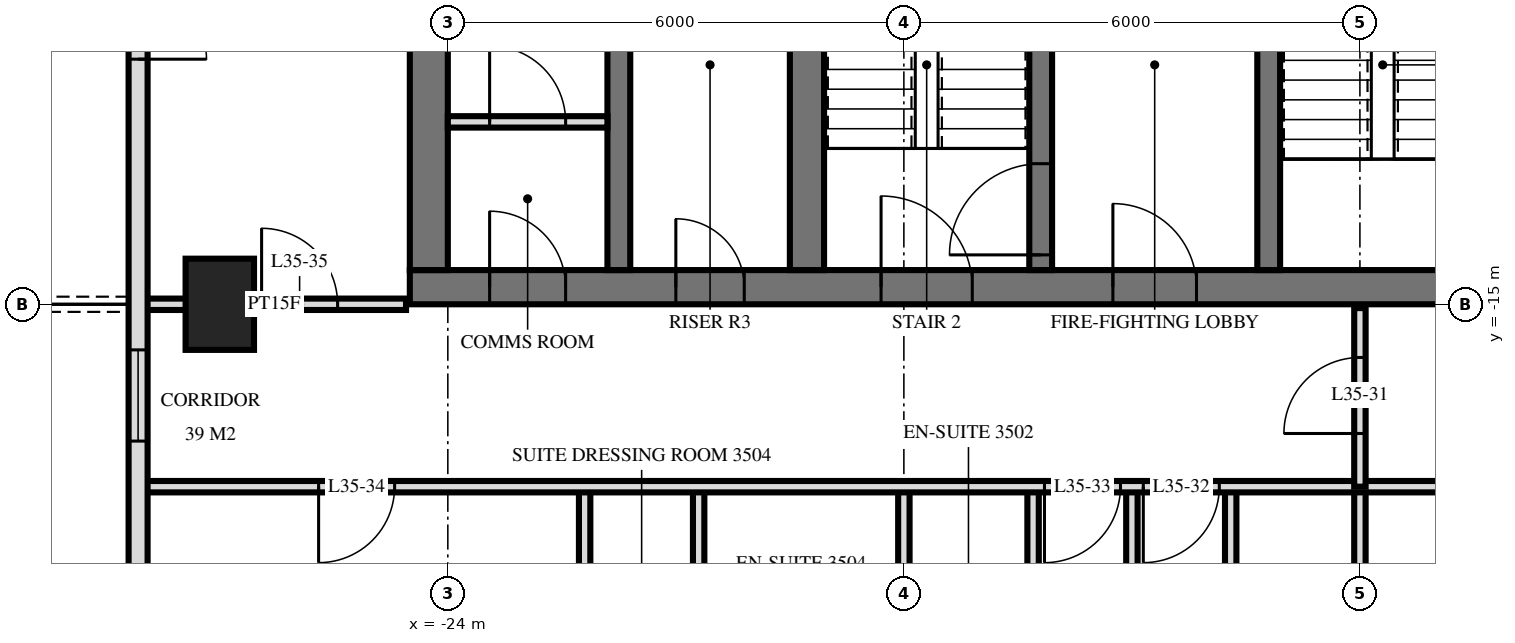
"""IFC4 building model, lengths in metres.
Left out: names, types, materials, properties, quantities, classifications, styles, units other than length and angle.
Written with IfcOpenShell. Run it as: python <this file> out.ifc"""

import sys

from ifc_helpers import new_model, si_unit, direction, frame, frame_2d, origin, origin_2d, place, context, subcontext, project, spatial, rectangle, extrude, element, fill, save


model = new_model("IFC4")
c1 = context("Model", 3, precision=1e-05, world=origin(), true_north=direction((0.0, 1.0)))
c2 = subcontext(c1, "Body", "Model", "MODEL_VIEW")
j1 = project(units=[si_unit("LENGTHUNIT", "METRE"), si_unit("PLANEANGLEUNIT", "RADIAN")], contexts=[c1])
p1 = place(None, origin())
s1 = spatial("IfcSite", under=j1, at=p1, CompositionType="ELEMENT")
p2 = place(p1, origin())
s2 = spatial("IfcBuilding", under=s1, at=p2, CompositionType="ELEMENT")
p3 = place(p2, frame((0.0, 0.0, 138.0)))
s3 = spatial("IfcBuildingStorey", under=s2, at=p3, CompositionType="ELEMENT", Elevation=138.0)
p4 = place(p3, frame((-27.0, -15.0, 0.0), z_axis=(0.0, 0.0, 1.0), x_axis=(0.0, 1.0, 0.0)))
e1 = element("IfcColumn", 1, at=p4, inside=s3, PredefinedType="COLUMN", context=c2, shape_type="SweptSolid", body=[
    extrude(rectangle(XDim=1.2, YDim=0.9, at=origin_2d()), origin(), (0.0, 0.0, 1.0), 3.6),
])
p5 = place(p3, frame((-24.5, -14.775, 0.0), z_axis=(0.0, 0.0, 1.0), x_axis=(1.0, 0.0, 0.0)))
e2 = element("IfcWall", 2, at=p5, inside=s3, PredefinedType="SHEAR", context=c2, shape_type="SweptSolid", body=[
    extrude(rectangle(XDim=14.5, YDim=0.45, at=frame_2d((7.25, 0.0))), origin(), (0.0, 0.0, 1.0), 3.6),
])
p6 = place(p5, frame((6.2, 0.0, 0.0)))
e3 = element("IfcOpeningElement", 3, at=p6, cuts=e2, PredefinedType="OPENING", context=c2, shape_type="SweptSolid", body=[
    extrude(rectangle(XDim=1.2, YDim=2.1, at=frame_2d((0.6, 1.05))), frame((0.0, 0.235, 0.0), z_axis=(0.0, -1.0, 0.0), x_axis=(1.0, 0.0, 0.0)), (0.0, 0.0, 1.0), 0.47),
])
p7 = place(p5, frame((9.25, 0.0, 0.0)))
e4 = element("IfcOpeningElement", 4, at=p7, cuts=e2, PredefinedType="OPENING", context=c2, shape_type="SweptSolid", body=[
    extrude(rectangle(XDim=1.1, YDim=2.1, at=frame_2d((0.55, 1.05))), frame((0.0, 0.235, 0.0), z_axis=(0.0, -1.0, 0.0), x_axis=(1.0, 0.0, 0.0)), (0.0, 0.0, 1.0), 0.47),
])
p8 = place(p5, frame((3.5, 0.0, 0.0)))
e5 = element("IfcOpeningElement", 5, at=p8, cuts=e2, PredefinedType="OPENING", context=c2, shape_type="SweptSolid", body=[
    extrude(rectangle(XDim=0.9, YDim=2.1, at=frame_2d((0.45, 1.05))), frame((0.0, 0.235, 0.0), z_axis=(0.0, -1.0, 0.0), x_axis=(1.0, 0.0, 0.0)), (0.0, 0.0, 1.0), 0.47),
])
p9 = place(p5, frame((1.05, 0.0, 0.0)))
e6 = element("IfcOpeningElement", 6, at=p9, cuts=e2, PredefinedType="OPENING", context=c2, shape_type="SweptSolid", body=[
    extrude(rectangle(XDim=1.0, YDim=2.1, at=frame_2d((0.5, 1.05))), frame((0.0, 0.235, 0.0), z_axis=(0.0, -1.0, 0.0), x_axis=(1.0, 0.0, 0.0)), (0.0, 0.0, 1.0), 0.47),
])
p10 = place(p3, frame((-24.25, -14.55, 0.0), z_axis=(0.0, 0.0, 1.0), x_axis=(0.0, 1.0, 0.0)))
e7 = element("IfcWall", 7, at=p10, inside=s3, PredefinedType="SHEAR", context=c2, shape_type="SweptSolid", body=[
    extrude(rectangle(XDim=14.1, YDim=0.5, at=frame_2d((7.05, 0.0))), origin(), (0.0, 0.0, 1.0), 3.6),
])
p11 = place(p3, frame((-13.2, -14.55, 0.0), z_axis=(0.0, 0.0, 1.0), x_axis=(0.0, 1.0, 0.0)))
e8 = element("IfcWall", 8, at=p11, inside=s3, PredefinedType="SHEAR", context=c2, shape_type="SweptSolid", body=[
    extrude(rectangle(XDim=5.4, YDim=0.3, at=frame_2d((2.7, 0.0))), origin(), (0.0, 0.0, 1.0), 3.6),
])
p12 = place(p11, frame((4.0, 0.0, 0.0)))
e9 = element("IfcOpeningElement", 9, at=p12, cuts=e8, PredefinedType="OPENING", context=c2, shape_type="SweptSolid", body=[
    extrude(rectangle(XDim=1.2, YDim=2.1, at=frame_2d((0.6, 1.05))), frame((0.0, 0.16, 0.0), z_axis=(0.0, -1.0, 0.0), x_axis=(1.0, 0.0, 0.0)), (0.0, 0.0, 1.0), 0.32),
])
p13 = place(p3, frame((-16.2, -14.55, 0.0), z_axis=(0.0, 0.0, 1.0), x_axis=(0.0, 1.0, 0.0)))
e10 = element("IfcWall", 10, at=p13, inside=s3, PredefinedType="SHEAR", context=c2, shape_type="SweptSolid", body=[
    extrude(rectangle(XDim=5.4, YDim=0.3, at=frame_2d((2.7, 0.0))), origin(), (0.0, 0.0, 1.0), 3.6),
])
p14 = place(p13, frame((0.2, 0.0, 0.0)))
e11 = element("IfcOpeningElement", 11, at=p14, cuts=e10, PredefinedType="OPENING", context=c2, shape_type="SweptSolid", body=[
    extrude(rectangle(XDim=1.2, YDim=2.1, at=frame_2d((0.6, 1.05))), frame((0.0, 0.16, 0.0), z_axis=(0.0, -1.0, 0.0), x_axis=(1.0, 0.0, 0.0)), (0.0, 0.0, 1.0), 0.32),
])
p15 = place(p3, frame((-19.275, -14.55, 0.0), z_axis=(0.0, 0.0, 1.0), x_axis=(0.0, 1.0, 0.0)))
e12 = element("IfcWall", 12, at=p15, inside=s3, PredefinedType="SHEAR", context=c2, shape_type="SweptSolid", body=[
    extrude(rectangle(XDim=5.4, YDim=0.45, at=frame_2d((2.7, 0.0))), origin(), (0.0, 0.0, 1.0), 3.6),
])
p16 = place(p3, frame((-21.75, -14.55, 0.0), z_axis=(0.0, 0.0, 1.0), x_axis=(0.0, 1.0, 0.0)))
e13 = element("IfcWall", 13, at=p16, inside=s3, PredefinedType="SHEAR", context=c2, shape_type="SweptSolid", body=[
    extrude(rectangle(XDim=5.4, YDim=0.3, at=frame_2d((2.7, 0.0))), origin(), (0.0, 0.0, 1.0), 3.6),
])
p17 = place(p3, frame((-28.075, -3.325, 0.0), z_axis=(0.0, 0.0, 1.0), x_axis=(0.0, -1.0, 0.0)))
e14 = element("IfcWall", 14, at=p17, inside=s3, PredefinedType="SOLIDWALL", context=c2, shape_type="SweptSolid", body=[
    extrude(rectangle(XDim=25.951, YDim=0.25, at=frame_2d((12.975, 0.0))), origin(), (0.0, 0.0, 1.0), 3.32),
])
p18 = place(p17, frame((6.65, 0.0, 0.0)))
e15 = element("IfcOpeningElement", 15, at=p18, cuts=e14, PredefinedType="OPENING", context=c2, shape_type="SweptSolid", body=[
    extrude(rectangle(XDim=1.8, YDim=2.4, at=frame_2d((0.9, 1.2))), frame((0.0, 0.135, 0.0), z_axis=(0.0, -1.0, 0.0), x_axis=(1.0, 0.0, 0.0)), (0.0, 0.0, 1.0), 0.27),
])
p19 = place(p17, frame((12.275, 0.0, 0.3)))
e16 = element("IfcOpeningElement", 16, at=p19, cuts=e14, PredefinedType="OPENING", context=c2, shape_type="SweptSolid", body=[
    extrude(rectangle(XDim=1.2, YDim=2.1, at=frame_2d((0.6, 1.05))), frame((0.0, 0.135, 0.0), z_axis=(0.0, -1.0, 0.0), x_axis=(1.0, 0.0, 0.0)), (0.0, 0.0, 1.0), 0.27),
])
p20 = place(p17, frame((15.575, 0.0, 0.3)))
e17 = element("IfcOpeningElement", 17, at=p20, cuts=e14, PredefinedType="OPENING", context=c2, shape_type="SweptSolid", body=[
    extrude(rectangle(XDim=1.2, YDim=2.1, at=frame_2d((0.6, 1.05))), frame((0.0, 0.135, 0.0), z_axis=(0.0, -1.0, 0.0), x_axis=(1.0, 0.0, 0.0)), (0.0, 0.0, 1.0), 0.27),
])
p21 = place(p17, frame((18.175, 0.0, 0.0)))
e18 = element("IfcOpeningElement", 18, at=p21, cuts=e14, PredefinedType="OPENING", context=c2, shape_type="SweptSolid", body=[
    extrude(rectangle(XDim=1.8, YDim=2.4, at=frame_2d((0.9, 1.2))), frame((0.0, 0.135, 0.0), z_axis=(0.0, -1.0, 0.0), x_axis=(1.0, 0.0, 0.0)), (0.0, 0.0, 1.0), 0.27),
])
p22 = place(p17, frame((21.075, 0.0, 0.0)))
e19 = element("IfcOpeningElement", 19, at=p22, cuts=e14, PredefinedType="OPENING", context=c2, shape_type="SweptSolid", body=[
    extrude(rectangle(XDim=1.8, YDim=2.4, at=frame_2d((0.9, 1.2))), frame((0.0, 0.135, 0.0), z_axis=(0.0, -1.0, 0.0), x_axis=(1.0, 0.0, 0.0)), (0.0, 0.0, 1.0), 0.27),
])
p23 = place(p17, frame((23.825, 0.0, 0.3)))
e20 = element("IfcOpeningElement", 20, at=p23, cuts=e14, PredefinedType="OPENING", context=c2, shape_type="SweptSolid", body=[
    extrude(rectangle(XDim=1.8, YDim=2.1, at=frame_2d((0.9, 1.05))), frame((0.0, 0.135, 0.0), z_axis=(0.0, -1.0, 0.0), x_axis=(1.0, 0.0, 0.0)), (0.0, 0.0, 1.0), 0.27),
])
p24 = place(p3, frame((-24.0, -12.6, 0.0), z_axis=(0.0, 0.0, 1.0), x_axis=(1.0, 0.0, 0.0)))
e21 = element("IfcWall", 21, at=p24, inside=s3, PredefinedType="PARTITIONING", context=c2, shape_type="SweptSolid", body=[
    extrude(rectangle(XDim=2.1, YDim=0.15, at=frame_2d((1.05, 0.0))), origin(), (0.0, 0.0, 1.0), 3.3),
])
p25 = place(p24, frame((0.55, 0.0, 0.0)))
e22 = element("IfcOpeningElement", 22, at=p25, cuts=e21, PredefinedType="OPENING", context=c2, shape_type="SweptSolid", body=[
    extrude(rectangle(XDim=1.0, YDim=2.1, at=frame_2d((0.5, 1.05))), frame((0.0, 0.085, 0.0), z_axis=(0.0, -1.0, 0.0), x_axis=(1.0, 0.0, 0.0)), (0.0, 0.0, 1.0), 0.17),
])
p26 = place(p3, frame((-12.0, -17.4, 0.0), z_axis=(0.0, 0.0, 1.0), x_axis=(0.0, 1.0, 0.0)))
e23 = element("IfcWall", 23, at=p26, inside=s3, PredefinedType="PARTITIONING", context=c2, shape_type="SweptSolid", body=[
    extrude(rectangle(XDim=2.35, YDim=0.15, at=frame_2d((1.175, 0.0))), origin(), (0.0, 0.0, 1.0), 3.32),
])
p27 = place(p26, frame((0.7, 0.0, 0.0)))
e24 = element("IfcOpeningElement", 24, at=p27, cuts=e23, PredefinedType="OPENING", context=c2, shape_type="SweptSolid", body=[
    extrude(rectangle(XDim=1.0, YDim=2.1, at=frame_2d((0.5, 1.05))), frame((0.0, 0.085, 0.0), z_axis=(0.0, -1.0, 0.0), x_axis=(1.0, 0.0, 0.0)), (0.0, 0.0, 1.0), 0.17),
])
p28 = place(p3, frame((-12.0, -33.62, 0.0), z_axis=(0.0, 0.0, 1.0), x_axis=(0.0, 1.0, 0.0)))
e25 = element("IfcWall", 25, at=p28, inside=s3, PredefinedType="PARTITIONING", context=c2, shape_type="SweptSolid", body=[
    extrude(rectangle(XDim=16.22, YDim=0.15, at=frame_2d((8.11, 0.0))), origin(), (0.0, 0.0, 1.0), 3.32),
])
p29 = place(p3, frame((-13.7, -21.2, 0.0), z_axis=(0.0, 0.0, 1.0), x_axis=(0.0, 1.0, 0.0)))
e26 = element("IfcWall", 26, at=p29, inside=s3, PredefinedType="PARTITIONING", context=c2, shape_type="SweptSolid", body=[
    extrude(rectangle(XDim=3.8, YDim=0.15, at=frame_2d((1.9, 0.0))), origin(), (0.0, 0.0, 1.0), 3.32),
])
p30 = place(p29, frame((1.5, 0.0, 0.0)))
e27 = element("IfcOpeningElement", 27, at=p30, cuts=e26, PredefinedType="OPENING", context=c2, shape_type="SweptSolid", body=[
    extrude(rectangle(XDim=0.8, YDim=2.1, at=frame_2d((0.4, 1.05))), frame((0.0, 0.085, 0.0), z_axis=(0.0, -1.0, 0.0), x_axis=(1.0, 0.0, 0.0)), (0.0, 0.0, 1.0), 0.17),
])
p31 = place(p3, frame((-15.0, -33.62, 0.0), z_axis=(0.0, 0.0, 1.0), x_axis=(0.0, 1.0, 0.0)))
e28 = element("IfcWall", 28, at=p31, inside=s3, PredefinedType="PARTITIONING", context=c2, shape_type="SweptSolid", body=[
    extrude(rectangle(XDim=16.22, YDim=0.15, at=frame_2d((8.11, 0.0))), origin(), (0.0, 0.0, 1.0), 3.32),
])
p32 = place(p3, frame((-16.3, -21.2, 0.0), z_axis=(0.0, 0.0, 1.0), x_axis=(0.0, 1.0, 0.0)))
e29 = element("IfcWall", 29, at=p32, inside=s3, PredefinedType="PARTITIONING", context=c2, shape_type="SweptSolid", body=[
    extrude(rectangle(XDim=3.8, YDim=0.15, at=frame_2d((1.9, 0.0))), origin(), (0.0, 0.0, 1.0), 3.32),
])
p33 = place(p32, frame((1.5, 0.0, 0.0)))
e30 = element("IfcOpeningElement", 30, at=p33, cuts=e29, PredefinedType="OPENING", context=c2, shape_type="SweptSolid", body=[
    extrude(rectangle(XDim=0.8, YDim=2.1, at=frame_2d((0.4, 1.05))), frame((0.0, 0.085, 0.0), z_axis=(0.0, -1.0, 0.0), x_axis=(1.0, 0.0, 0.0)), (0.0, 0.0, 1.0), 0.17),
])
p34 = place(p3, frame((-18.0, -33.62, 0.0), z_axis=(0.0, 0.0, 1.0), x_axis=(0.0, 1.0, 0.0)))
e31 = element("IfcWall", 31, at=p34, inside=s3, PredefinedType="PARTITIONING", context=c2, shape_type="SweptSolid", body=[
    extrude(rectangle(XDim=16.22, YDim=0.15, at=frame_2d((8.11, 0.0))), origin(), (0.0, 0.0, 1.0), 3.32),
])
p35 = place(p3, frame((-20.7, -20.4, 0.0), z_axis=(0.0, 0.0, 1.0), x_axis=(0.0, 1.0, 0.0)))
e32 = element("IfcWall", 32, at=p35, inside=s3, PredefinedType="PARTITIONING", context=c2, shape_type="SweptSolid", body=[
    extrude(rectangle(XDim=3.0, YDim=0.15, at=frame_2d((1.5, 0.0))), origin(), (0.0, 0.0, 1.0), 3.32),
])
p36 = place(p3, frame((-22.2, -20.4, 0.0), z_axis=(0.0, 0.0, 1.0), x_axis=(0.0, 1.0, 0.0)))
e33 = element("IfcWall", 33, at=p36, inside=s3, PredefinedType="PARTITIONING", context=c2, shape_type="SweptSolid", body=[
    extrude(rectangle(XDim=3.0, YDim=0.15, at=frame_2d((1.5, 0.0))), origin(), (0.0, 0.0, 1.0), 3.32),
])
p37 = place(p36, frame((1.05, 0.0, 0.0)))
e34 = element("IfcOpeningElement", 34, at=p37, cuts=e33, PredefinedType="OPENING", context=c2, shape_type="SweptSolid", body=[
    extrude(rectangle(XDim=0.9, YDim=2.1, at=frame_2d((0.45, 1.05))), frame((0.0, 0.085, 0.0), z_axis=(0.0, -1.0, 0.0), x_axis=(1.0, 0.0, 0.0)), (0.0, 0.0, 1.0), 0.17),
])
p38 = place(p3, frame((-28.02, -17.4, 0.0), z_axis=(0.0, 0.0, 1.0), x_axis=(1.0, 0.0, 0.0)))
e35 = element("IfcWall", 35, at=p38, inside=s3, PredefinedType="PARTITIONING", context=c2, shape_type="SweptSolid", body=[
    extrude(rectangle(XDim=56.04, YDim=0.15, at=frame_2d((28.02, 0.0))), origin(), (0.0, 0.0, 1.0), 3.32),
])
p39 = place(p38, frame((13.17, 0.0, 0.0)))
e36 = element("IfcOpeningElement", 36, at=p39, cuts=e35, PredefinedType="OPENING", context=c2, shape_type="SweptSolid", body=[
    extrude(rectangle(XDim=1.0, YDim=2.1, at=frame_2d((0.5, 1.05))), frame((0.0, 0.085, 0.0), z_axis=(0.0, -1.0, 0.0), x_axis=(1.0, 0.0, 0.0)), (0.0, 0.0, 1.0), 0.17),
])
p40 = place(p38, frame((11.87, 0.0, 0.0)))
e37 = element("IfcOpeningElement", 37, at=p40, cuts=e35, PredefinedType="OPENING", context=c2, shape_type="SweptSolid", body=[
    extrude(rectangle(XDim=1.0, YDim=2.1, at=frame_2d((0.5, 1.05))), frame((0.0, 0.085, 0.0), z_axis=(0.0, -1.0, 0.0), x_axis=(1.0, 0.0, 0.0)), (0.0, 0.0, 1.0), 0.17),
])
p41 = place(p38, frame((2.32, 0.0, 0.0)))
e38 = element("IfcOpeningElement", 38, at=p41, cuts=e35, PredefinedType="OPENING", context=c2, shape_type="SweptSolid", body=[
    extrude(rectangle(XDim=1.0, YDim=2.1, at=frame_2d((0.5, 1.05))), frame((0.0, 0.085, 0.0), z_axis=(0.0, -1.0, 0.0), x_axis=(1.0, 0.0, 0.0)), (0.0, 0.0, 1.0), 0.17),
])
p42 = place(p38, frame((40.17, 0.0, 0.0)))
e39 = element("IfcOpeningElement", 39, at=p42, cuts=e35, PredefinedType="OPENING", context=c2, shape_type="SweptSolid", body=[
    extrude(rectangle(XDim=1.0, YDim=2.1, at=frame_2d((0.5, 1.05))), frame((0.0, 0.085, 0.0), z_axis=(0.0, -1.0, 0.0), x_axis=(1.0, 0.0, 0.0)), (0.0, 0.0, 1.0), 0.17),
])
p43 = place(p38, frame((51.22, 0.0, 0.0)))
e40 = element("IfcOpeningElement", 40, at=p43, cuts=e35, PredefinedType="OPENING", context=c2, shape_type="SweptSolid", body=[
    extrude(rectangle(XDim=1.0, YDim=2.1, at=frame_2d((0.5, 1.05))), frame((0.0, 0.085, 0.0), z_axis=(0.0, -1.0, 0.0), x_axis=(1.0, 0.0, 0.0)), (0.0, 0.0, 1.0), 0.17),
])
p44 = place(p38, frame((18.52, 0.0, 0.0)))
e41 = element("IfcOpeningElement", 41, at=p44, cuts=e35, PredefinedType="OPENING", context=c2, shape_type="SweptSolid", body=[
    extrude(rectangle(XDim=1.0, YDim=2.1, at=frame_2d((0.5, 1.05))), frame((0.0, 0.085, 0.0), z_axis=(0.0, -1.0, 0.0), x_axis=(1.0, 0.0, 0.0)), (0.0, 0.0, 1.0), 0.17),
])
p45 = place(p38, frame((26.02, 0.0, 0.0)))
e42 = element("IfcOpeningElement", 42, at=p45, cuts=e35, PredefinedType="OPENING", context=c2, shape_type="SweptSolid", body=[
    extrude(rectangle(XDim=1.0, YDim=2.1, at=frame_2d((0.5, 1.05))), frame((0.0, 0.085, 0.0), z_axis=(0.0, -1.0, 0.0), x_axis=(1.0, 0.0, 0.0)), (0.0, 0.0, 1.0), 0.17),
])
p46 = place(p38, frame((35.02, 0.0, 0.0)))
e43 = element("IfcOpeningElement", 43, at=p46, cuts=e35, PredefinedType="OPENING", context=c2, shape_type="SweptSolid", body=[
    extrude(rectangle(XDim=1.0, YDim=2.1, at=frame_2d((0.5, 1.05))), frame((0.0, 0.085, 0.0), z_axis=(0.0, -1.0, 0.0), x_axis=(1.0, 0.0, 0.0)), (0.0, 0.0, 1.0), 0.17),
])
p47 = place(p3, frame((-28.02, -15.0, 0.0), z_axis=(0.0, 0.0, 1.0), x_axis=(1.0, 0.0, 0.0)))
e44 = element("IfcWall", 44, at=p47, inside=s3, PredefinedType="PARTITIONING", context=c2, shape_type="SweptSolid", body=[
    extrude(rectangle(XDim=3.47, YDim=0.15, at=frame_2d((1.735, 0.0))), origin(), (0.0, 0.0, 1.0), 3.32),
])
p48 = place(p47, frame((1.57, 0.0, 0.0)))
e45 = element("IfcOpeningElement", 45, at=p48, cuts=e44, PredefinedType="OPENING", context=c2, shape_type="SweptSolid", body=[
    extrude(rectangle(XDim=1.0, YDim=2.1, at=frame_2d((0.5, 1.05))), frame((0.0, 0.085, 0.0), z_axis=(0.0, -1.0, 0.0), x_axis=(1.0, 0.0, 0.0)), (0.0, 0.0, 1.0), 0.17),
])
p49 = place(p18, origin())
e46 = element("IfcDoor", 46, at=p49, inside=s3, OperationType="DOUBLE_DOOR_SINGLE_SWING", PredefinedType="DOOR", context=c2, shape_type="SweptSolid", body=[
    extrude(rectangle(XDim=1.8, YDim=2.4, at=frame_2d((0.9, 1.2))), frame((0.0, 0.025, 0.0), z_axis=(0.0, -1.0, 0.0), x_axis=(1.0, 0.0, 0.0)), (0.0, 0.0, 1.0), 0.05),
])
fill(e15, e46)
p50 = place(p19, origin())
e47 = element("IfcWindow", 47, at=p50, inside=s3, PartitioningType="SINGLE_PANEL", PredefinedType="WINDOW", context=c2, shape_type="SweptSolid", body=[
    extrude(rectangle(XDim=1.2, YDim=2.1, at=frame_2d((0.6, 1.05))), frame((0.0, 0.03, 0.0), z_axis=(0.0, -1.0, 0.0), x_axis=(1.0, 0.0, 0.0)), (0.0, 0.0, 1.0), 0.06),
])
fill(e16, e47)
p51 = place(p6, origin())
e48 = element("IfcDoor", 48, at=p51, inside=s3, OperationType="SINGLE_SWING_RIGHT", PredefinedType="DOOR", context=c2, shape_type="SweptSolid", body=[
    extrude(rectangle(XDim=1.2, YDim=2.1, at=frame_2d((0.6, 1.05))), frame((0.0, 0.025, 0.0), z_axis=(0.0, -1.0, 0.0), x_axis=(1.0, 0.0, 0.0)), (0.0, 0.0, 1.0), 0.05),
])
fill(e3, e48)
p52 = place(p7, origin())
e49 = element("IfcDoor", 49, at=p52, inside=s3, OperationType="SINGLE_SWING_RIGHT", PredefinedType="DOOR", context=c2, shape_type="SweptSolid", body=[
    extrude(rectangle(XDim=1.1, YDim=2.1, at=frame_2d((0.55, 1.05))), frame((0.0, 0.025, 0.0), z_axis=(0.0, -1.0, 0.0), x_axis=(1.0, 0.0, 0.0)), (0.0, 0.0, 1.0), 0.05),
])
fill(e4, e49)
p53 = place(p8, origin())
e50 = element("IfcDoor", 50, at=p53, inside=s3, OperationType="SINGLE_SWING_RIGHT", PredefinedType="DOOR", context=c2, shape_type="SweptSolid", body=[
    extrude(rectangle(XDim=0.9, YDim=2.1, at=frame_2d((0.45, 1.05))), frame((0.0, 0.025, 0.0), z_axis=(0.0, -1.0, 0.0), x_axis=(1.0, 0.0, 0.0)), (0.0, 0.0, 1.0), 0.05),
])
fill(e5, e50)
p54 = place(p9, origin())
e51 = element("IfcDoor", 51, at=p54, inside=s3, OperationType="SINGLE_SWING_RIGHT", PredefinedType="DOOR", context=c2, shape_type="SweptSolid", body=[
    extrude(rectangle(XDim=1.0, YDim=2.1, at=frame_2d((0.5, 1.05))), frame((0.0, 0.025, 0.0), z_axis=(0.0, -1.0, 0.0), x_axis=(1.0, 0.0, 0.0)), (0.0, 0.0, 1.0), 0.05),
])
fill(e6, e51)
p55 = place(p14, origin())
e52 = element("IfcDoor", 52, at=p55, inside=s3, OperationType="SINGLE_SWING_RIGHT", PredefinedType="DOOR", context=c2, shape_type="SweptSolid", body=[
    extrude(rectangle(XDim=1.2, YDim=2.1, at=frame_2d((0.6, 1.05))), frame((0.0, 0.025, 0.0), z_axis=(0.0, -1.0, 0.0), x_axis=(1.0, 0.0, 0.0)), (0.0, 0.0, 1.0), 0.05),
])
fill(e11, e52)
p56 = place(p25, origin())
e53 = element("IfcDoor", 53, at=p56, inside=s3, OperationType="SINGLE_SWING_RIGHT", PredefinedType="DOOR", context=c2, shape_type="SweptSolid", body=[
    extrude(rectangle(XDim=1.0, YDim=2.1, at=frame_2d((0.5, 1.05))), frame((0.0, 0.025, 0.0), z_axis=(0.0, -1.0, 0.0), x_axis=(1.0, 0.0, 0.0)), (0.0, 0.0, 1.0), 0.05),
])
fill(e22, e53)
p57 = place(p27, origin())
e54 = element("IfcDoor", 54, at=p57, inside=s3, OperationType="SINGLE_SWING_RIGHT", PredefinedType="DOOR", context=c2, shape_type="SweptSolid", body=[
    extrude(rectangle(XDim=1.0, YDim=2.1, at=frame_2d((0.5, 1.05))), frame((0.0, 0.025, 0.0), z_axis=(0.0, -1.0, 0.0), x_axis=(1.0, 0.0, 0.0)), (0.0, 0.0, 1.0), 0.05),
])
fill(e24, e54)
p58 = place(p39, frame((0.5, 0.0, 0.0), z_axis=(0.0, 0.0, 1.0), x_axis=(-1.0, 0.0, 0.0)))
e55 = element("IfcDoor", 55, at=p58, inside=s3, OperationType="SINGLE_SWING_LEFT", PredefinedType="DOOR", context=c2, shape_type="SweptSolid", body=[
    extrude(rectangle(XDim=1.0, YDim=2.1, at=frame_2d((0.0, 1.05))), frame((0.0, -0.025, 0.0), z_axis=(0.0, 1.0, 0.0), x_axis=(-1.0, 0.0, 0.0)), (0.0, 0.0, 1.0), 0.05),
])
fill(e36, e55)
p59 = place(p40, frame((0.5, 0.0, 0.0), z_axis=(0.0, 0.0, 1.0), x_axis=(-1.0, 0.0, 0.0)))
e56 = element("IfcDoor", 56, at=p59, inside=s3, OperationType="SINGLE_SWING_LEFT", PredefinedType="DOOR", context=c2, shape_type="SweptSolid", body=[
    extrude(rectangle(XDim=1.0, YDim=2.1, at=frame_2d((0.0, 1.05))), frame((0.0, -0.025, 0.0), z_axis=(0.0, 1.0, 0.0), x_axis=(-1.0, 0.0, 0.0)), (0.0, 0.0, 1.0), 0.05),
])
fill(e37, e56)
p60 = place(p41, frame((0.5, 0.0, 0.0), z_axis=(0.0, 0.0, 1.0), x_axis=(-1.0, 0.0, 0.0)))
e57 = element("IfcDoor", 57, at=p60, inside=s3, OperationType="SINGLE_SWING_LEFT", PredefinedType="DOOR", context=c2, shape_type="SweptSolid", body=[
    extrude(rectangle(XDim=1.0, YDim=2.1, at=frame_2d((0.0, 1.05))), frame((0.0, -0.025, 0.0), z_axis=(0.0, 1.0, 0.0), x_axis=(-1.0, 0.0, 0.0)), (0.0, 0.0, 1.0), 0.05),
])
fill(e38, e57)
p61 = place(p48, origin())
e58 = element("IfcDoor", 58, at=p61, inside=s3, OperationType="SINGLE_SWING_RIGHT", PredefinedType="DOOR", context=c2, shape_type="SweptSolid", body=[
    extrude(rectangle(XDim=1.0, YDim=2.1, at=frame_2d((0.5, 1.05))), frame((0.0, 0.025, 0.0), z_axis=(0.0, -1.0, 0.0), x_axis=(1.0, 0.0, 0.0)), (0.0, 0.0, 1.0), 0.05),
])
fill(e45, e58)
save(model, sys.argv[1])
